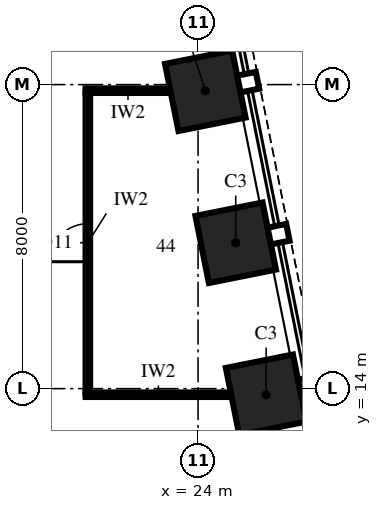
"""IFC4 building model, lengths in metres.
Left out: names, types, materials, properties, quantities, classifications, styles, units other than length and angle.
Written with IfcOpenShell. Run it as: python <this file> out.ifc"""

import sys

from ifc_helpers import new_model, si_unit, direction, frame, frame_2d, origin, origin_2d, place, context, subcontext, project, spatial, rectangle, extrude, element, fill, save


model = new_model("IFC4")
c1 = context("Model", 3, precision=1e-05, world=origin(), true_north=direction((0.0, 1.0)))
c2 = subcontext(c1, "Body", "Model", "MODEL_VIEW")
j1 = project(units=[si_unit("LENGTHUNIT", "METRE"), si_unit("PLANEANGLEUNIT", "RADIAN")], contexts=[c1])
p1 = place(None, origin())
s1 = spatial("IfcSite", under=j1, at=p1, CompositionType="ELEMENT")
p2 = place(p1, origin())
s2 = spatial("IfcBuilding", under=s1, at=p2, CompositionType="ELEMENT")
p3 = place(p2, frame((0.0, 0.0, 139.0)))
s3 = spatial("IfcBuildingStorey", under=s2, at=p3, CompositionType="ELEMENT", Elevation=139.0)
for number, where, z_axis, x_axis in (
    (1, (25.791, 13.838, 0.0), (0.0, 0.0, 1.0), (-0.196, 0.981, 0.0)),
    (2, (24.991, 17.838, 0.0), (0.0, 0.0, 1.0), (-0.196, 0.981, 0.0)),
    (3, (24.191, 21.838, 0.0), (0.0, 0.0, 1.0), (-0.196, 0.981, 0.0)),
):
    element("IfcColumn", number, at=place(p3, frame(where, z_axis=z_axis, x_axis=x_axis)), inside=s3, PredefinedType="COLUMN", context=c2, shape_type="SweptSolid", body=[
        extrude(rectangle(XDim=1.8, YDim=1.8, at=origin_2d()), origin(), (0.0, 0.0, 1.0), 4.0),
    ])
p4 = place(p3, frame((21.04, 13.84, 0.0), z_axis=(0.0, 0.0, 1.0), x_axis=(1.0, 0.0, 0.0)))
e4 = element("IfcWall", 4, at=p4, inside=s3, PredefinedType="PARTITIONING", context=c2, shape_type="SweptSolid", body=[
    extrude(rectangle(XDim=3.833, YDim=0.12, at=frame_2d((1.917, 0.0))), origin(), (0.0, 0.0, 1.0), 3.25),
])
p5 = place(p3, frame((21.04, 21.84, 0.0), z_axis=(0.0, 0.0, 1.0), x_axis=(1.0, 0.0, 0.0)))
e5 = element("IfcWall", 5, at=p5, inside=s3, PredefinedType="PARTITIONING", context=c2, shape_type="SweptSolid", body=[
    extrude(rectangle(XDim=2.233, YDim=0.12, at=frame_2d((1.116, 0.0))), origin(), (0.0, 0.0, 1.0), 3.25),
])
p6 = place(p3, frame((21.1, 13.9, 0.0), z_axis=(0.0, 0.0, 1.0), x_axis=(0.0, 1.0, 0.0)))
e6 = element("IfcWall", 6, at=p6, inside=s3, PredefinedType="PARTITIONING", context=c2, shape_type="SweptSolid", body=[
    extrude(rectangle(XDim=7.88, YDim=0.12, at=frame_2d((3.94, 0.0))), origin(), (0.0, 0.0, 1.0), 3.25),
])
p7 = place(p6, frame((3.44, 0.0, 0.0)))
e7 = element("IfcOpeningElement", 7, at=p7, cuts=e6, PredefinedType="OPENING", context=c2, shape_type="SweptSolid", body=[
    extrude(rectangle(XDim=1.0, YDim=2.4, at=frame_2d((0.5, 1.2))), frame((0.0, 0.075, 0.0), z_axis=(0.0, -1.0, 0.0), x_axis=(1.0, 0.0, 0.0)), (0.0, 0.0, 1.0), 0.15),
])
p8 = place(p7, origin())
e8 = element("IfcDoor", 8, at=p8, inside=s3, OperationType="SINGLE_SWING_RIGHT", PredefinedType="DOOR", context=c2, shape_type="SweptSolid", body=[
    extrude(rectangle(XDim=1.0, YDim=2.4, at=frame_2d((0.5, 1.2))), frame((0.0, 0.06, 0.0), z_axis=(0.0, -1.0, 0.0), x_axis=(1.0, 0.0, 0.0)), (0.0, 0.0, 1.0), 0.12),
])
fill(e7, e8)
save(model, sys.argv[1])
